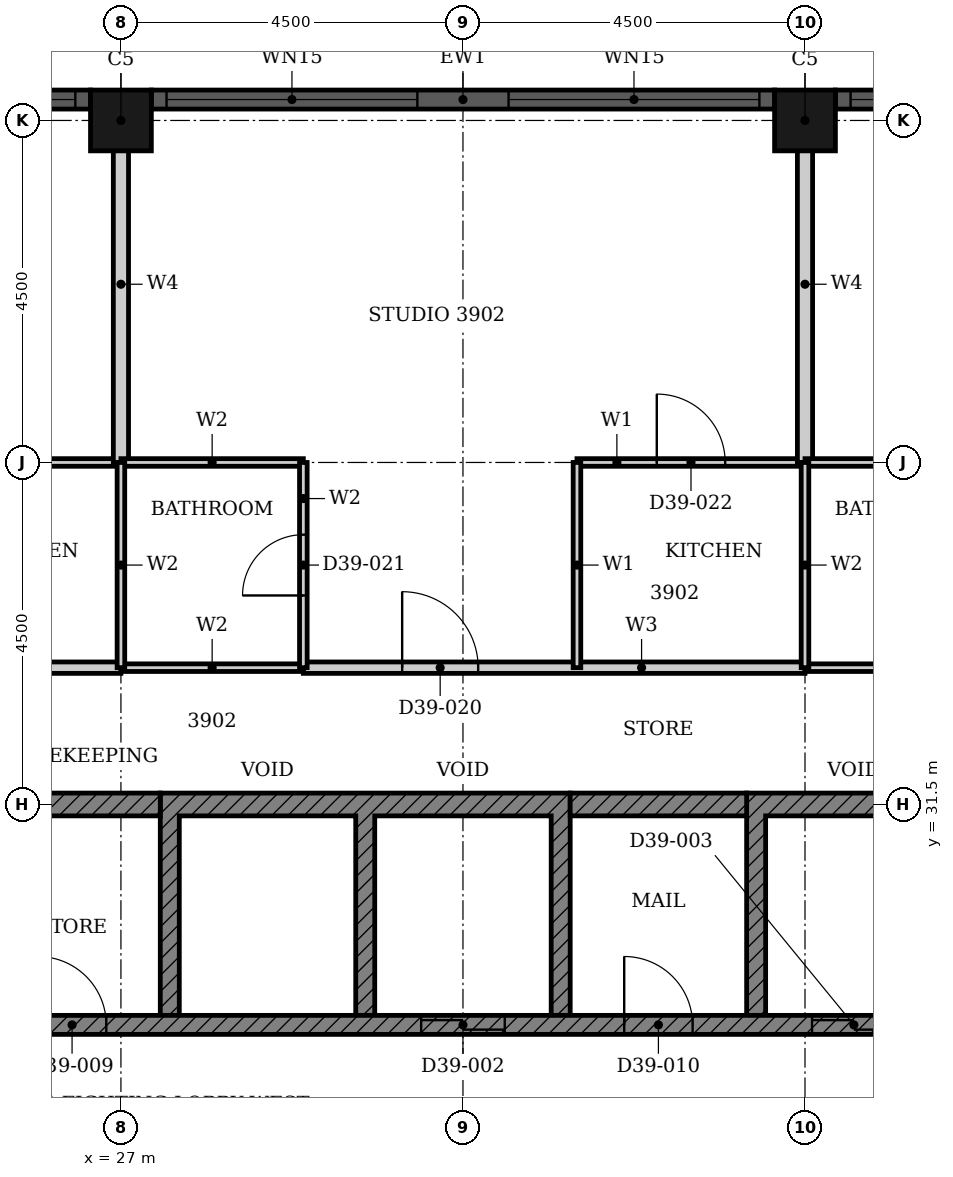
"""IFC4 building model, lengths in metres.
Left out: names, types, materials, properties, quantities, classifications, styles, units other than length and angle.
Written with IfcOpenShell. Run it as: python <this file> out.ifc"""

import sys

from ifc_helpers import new_model, si_unit, direction, frame, frame_2d, origin, origin_2d, place, context, subcontext, project, spatial, polyline, rectangle, hollow_rectangle, outline, extrude, element, fill, save


model = new_model("IFC4")
c1 = context("Model", 3, precision=1e-05, world=origin(), true_north=direction((0.0, 1.0)))
c2 = subcontext(c1, "Body", "Model", "MODEL_VIEW")
j1 = project(units=[si_unit("LENGTHUNIT", "METRE"), si_unit("PLANEANGLEUNIT", "RADIAN")], contexts=[c1])
p1 = place(None, origin())
s1 = spatial("IfcSite", under=j1, at=p1, CompositionType="ELEMENT")
p2 = place(p1, origin())
s2 = spatial("IfcBuilding", under=s1, at=p2, CompositionType="ELEMENT")
p3 = place(p2, frame((0.0, 0.0, 158.0)))
s3 = spatial("IfcBuildingStorey", under=s2, at=p3, CompositionType="ELEMENT", Elevation=158.0)
for number, where, z_axis, x_axis in (
    (1, (36.0, 40.5, 0.0), (0.0, 0.0, 1.0), (1.0, 0.0, 0.0)),
    (2, (27.0, 40.5, 0.0), (0.0, 0.0, 1.0), (1.0, 0.0, 0.0)),
):
    element("IfcColumn", number, at=place(p3, frame(where, z_axis=z_axis, x_axis=x_axis)), inside=s3, PredefinedType="COLUMN", context=c2, shape_type="SweptSolid", body=[
        extrude(hollow_rectangle(XDim=0.8, YDim=0.8, WallThickness=0.025, at=origin_2d()), origin(), (0.0, 0.0, 1.0), 3.7),
    ])
p4 = place(p3, frame((44.6, 40.775, 0.0), z_axis=(0.0, 0.0, 1.0), x_axis=(-1.0, 0.0, 0.0)))
e3 = element("IfcWall", 3, at=p4, inside=s3, PredefinedType="SOLIDWALL", context=c2, shape_type="SweptSolid", body=[
    extrude(rectangle(XDim=8.2, YDim=0.25, at=frame_2d((4.1, 0.0))), origin(), (0.0, 0.0, 1.0), 3.7),
])
p5 = place(p4, frame((0.2, 0.0, 0.45)))
e4 = element("IfcOpeningElement", 4, at=p5, cuts=e3, PredefinedType="OPENING", context=c2, shape_type="SweptSolid", body=[
    extrude(rectangle(XDim=3.3, YDim=2.3, at=frame_2d((1.65, 1.15))), frame((0.0, 0.135, 0.0), z_axis=(0.0, -1.0, 0.0), x_axis=(1.0, 0.0, 0.0)), (0.0, 0.0, 1.0), 0.27),
])
p6 = place(p4, frame((4.7, 0.0, 0.45)))
e5 = element("IfcOpeningElement", 5, at=p6, cuts=e3, PredefinedType="OPENING", context=c2, shape_type="SweptSolid", body=[
    extrude(rectangle(XDim=3.3, YDim=2.3, at=frame_2d((1.65, 1.15))), frame((0.0, 0.135, 0.0), z_axis=(0.0, -1.0, 0.0), x_axis=(1.0, 0.0, 0.0)), (0.0, 0.0, 1.0), 0.27),
])
p7 = place(p3, frame((35.6, 40.775, 0.0), z_axis=(0.0, 0.0, 1.0), x_axis=(-1.0, 0.0, 0.0)))
e6 = element("IfcWall", 6, at=p7, inside=s3, PredefinedType="SOLIDWALL", context=c2, shape_type="SweptSolid", body=[
    extrude(rectangle(XDim=8.2, YDim=0.25, at=frame_2d((4.1, 0.0))), origin(), (0.0, 0.0, 1.0), 3.7),
])
p8 = place(p7, frame((0.2, 0.0, 0.45)))
e7 = element("IfcOpeningElement", 7, at=p8, cuts=e6, PredefinedType="OPENING", context=c2, shape_type="SweptSolid", body=[
    extrude(rectangle(XDim=3.3, YDim=2.3, at=frame_2d((1.65, 1.15))), frame((0.0, 0.135, 0.0), z_axis=(0.0, -1.0, 0.0), x_axis=(1.0, 0.0, 0.0)), (0.0, 0.0, 1.0), 0.27),
])
p9 = place(p7, frame((4.7, 0.0, 0.45)))
e8 = element("IfcOpeningElement", 8, at=p9, cuts=e6, PredefinedType="OPENING", context=c2, shape_type="SweptSolid", body=[
    extrude(rectangle(XDim=3.3, YDim=2.3, at=frame_2d((1.65, 1.15))), frame((0.0, 0.135, 0.0), z_axis=(0.0, -1.0, 0.0), x_axis=(1.0, 0.0, 0.0)), (0.0, 0.0, 1.0), 0.27),
])
p10 = place(p3, frame((26.6, 40.775, 0.0), z_axis=(0.0, 0.0, 1.0), x_axis=(-1.0, 0.0, 0.0)))
e9 = element("IfcWall", 9, at=p10, inside=s3, PredefinedType="SOLIDWALL", context=c2, shape_type="SweptSolid", body=[
    extrude(rectangle(XDim=8.2, YDim=0.25, at=frame_2d((4.1, 0.0))), origin(), (0.0, 0.0, 1.0), 3.7),
])
p11 = place(p10, frame((0.2, 0.0, 0.45)))
e10 = element("IfcOpeningElement", 10, at=p11, cuts=e9, PredefinedType="OPENING", context=c2, shape_type="SweptSolid", body=[
    extrude(rectangle(XDim=3.3, YDim=2.3, at=frame_2d((1.65, 1.15))), frame((0.0, 0.135, 0.0), z_axis=(0.0, -1.0, 0.0), x_axis=(1.0, 0.0, 0.0)), (0.0, 0.0, 1.0), 0.27),
])
p12 = place(p10, frame((4.7, 0.0, 0.45)))
e11 = element("IfcOpeningElement", 11, at=p12, cuts=e9, PredefinedType="OPENING", context=c2, shape_type="SweptSolid", body=[
    extrude(rectangle(XDim=3.3, YDim=2.3, at=frame_2d((1.65, 1.15))), frame((0.0, 0.135, 0.0), z_axis=(0.0, -1.0, 0.0), x_axis=(1.0, 0.0, 0.0)), (0.0, 0.0, 1.0), 0.27),
])
p13 = place(p3, origin())
e12 = element("IfcWall", 12, at=p13, inside=s3, PredefinedType="SHEAR", context=c2, shape_type="SweptSolid", body=[
    extrude(outline(polyline([(27.518, 28.725), (27.768, 28.725), (27.768, 31.35), (30.089, 31.35), (30.089, 28.725), (30.339, 28.725), (30.339, 31.35), (32.661, 31.35), (32.661, 28.725), (32.911, 28.725), (32.911, 31.65), (27.518, 31.65), (27.518, 28.725)])), origin(), (0.0, 0.0, 1.0), 3.4),
])
p14 = place(p3, origin())
e13 = element("IfcWall", 13, at=p14, inside=s3, PredefinedType="SHEAR", context=c2, shape_type="SweptSolid", body=[
    extrude(outline(polyline([(35.232, 28.725), (35.482, 28.725), (35.482, 31.35), (37.803, 31.35), (37.803, 28.725), (38.053, 28.725), (38.053, 31.35), (40.375, 31.35), (40.375, 28.725), (40.625, 28.725), (40.625, 31.65), (35.232, 31.65), (35.232, 28.725)])), origin(), (0.0, 0.0, 1.0), 3.4),
])
p15 = place(p3, frame((18.15, 31.5, 0.0), z_axis=(0.0, 0.0, 1.0), x_axis=(1.0, 0.0, 0.0)))
e14 = element("IfcWall", 14, at=p15, inside=s3, PredefinedType="SHEAR", context=c2, shape_type="SweptSolid", body=[
    extrude(rectangle(XDim=9.368, YDim=0.3, at=frame_2d((4.684, 0.0))), origin(), (0.0, 0.0, 1.0), 3.4),
])
p16 = place(p15, frame((4.736, 0.0, 0.0)))
e15 = element("IfcOpeningElement", 15, at=p16, cuts=e14, PredefinedType="OPENING", context=c2, shape_type="SweptSolid", body=[
    extrude(rectangle(XDim=1.8, YDim=2.1, at=frame_2d((0.9, 1.05))), frame((0.0, 0.16, 0.0), z_axis=(0.0, -1.0, 0.0), x_axis=(1.0, 0.0, 0.0)), (0.0, 0.0, 1.0), 0.32),
])
p17 = place(p3, frame((32.911, 31.5, 0.0), z_axis=(0.0, 0.0, 1.0), x_axis=(1.0, 0.0, 0.0)))
e16 = element("IfcWall", 16, at=p17, inside=s3, PredefinedType="SHEAR", context=c2, shape_type="SweptSolid", body=[
    extrude(rectangle(XDim=2.322, YDim=0.3, at=frame_2d((1.161, 0.0))), origin(), (0.0, 0.0, 1.0), 3.4),
])
p18 = place(p3, frame((24.947, 28.6, 0.0), z_axis=(0.0, 0.0, 1.0), x_axis=(1.0, 0.0, 0.0)))
e17 = element("IfcWall", 17, at=p18, inside=s3, PredefinedType="SHEAR", context=c2, shape_type="SweptSolid", body=[
    extrude(rectangle(XDim=15.678, YDim=0.25, at=frame_2d((7.839, 0.0))), origin(), (0.0, 0.0, 1.0), 3.4),
])
p19 = place(p18, frame((6.004, 0.0, 0.0)))
e18 = element("IfcOpeningElement", 18, at=p19, cuts=e17, PredefinedType="OPENING", context=c2, shape_type="SweptSolid", body=[
    extrude(rectangle(XDim=1.1, YDim=2.1, at=frame_2d((0.55, 1.05))), frame((0.0, 0.135, 0.0), z_axis=(0.0, -1.0, 0.0), x_axis=(1.0, 0.0, 0.0)), (0.0, 0.0, 1.0), 0.27),
])
p20 = place(p18, frame((11.146, 0.0, 0.0)))
e19 = element("IfcOpeningElement", 19, at=p20, cuts=e17, PredefinedType="OPENING", context=c2, shape_type="SweptSolid", body=[
    extrude(rectangle(XDim=1.1, YDim=2.1, at=frame_2d((0.55, 1.05))), frame((0.0, 0.135, 0.0), z_axis=(0.0, -1.0, 0.0), x_axis=(1.0, 0.0, 0.0)), (0.0, 0.0, 1.0), 0.27),
])
p21 = place(p18, frame((13.718, 0.0, 0.0)))
e20 = element("IfcOpeningElement", 20, at=p21, cuts=e17, PredefinedType="OPENING", context=c2, shape_type="SweptSolid", body=[
    extrude(rectangle(XDim=1.1, YDim=2.1, at=frame_2d((0.55, 1.05))), frame((0.0, 0.135, 0.0), z_axis=(0.0, -1.0, 0.0), x_axis=(1.0, 0.0, 0.0)), (0.0, 0.0, 1.0), 0.27),
])
p22 = place(p18, frame((0.961, 0.0, 0.0)))
e21 = element("IfcOpeningElement", 21, at=p22, cuts=e17, PredefinedType="OPENING", context=c2, shape_type="SweptSolid", body=[
    extrude(rectangle(XDim=0.9, YDim=2.1, at=frame_2d((0.45, 1.05))), frame((0.0, 0.135, 0.0), z_axis=(0.0, -1.0, 0.0), x_axis=(1.0, 0.0, 0.0)), (0.0, 0.0, 1.0), 0.27),
])
p23 = place(p18, frame((8.675, 0.0, 0.0)))
e22 = element("IfcOpeningElement", 22, at=p23, cuts=e17, PredefinedType="OPENING", context=c2, shape_type="SweptSolid", body=[
    extrude(rectangle(XDim=0.9, YDim=2.1, at=frame_2d((0.45, 1.05))), frame((0.0, 0.135, 0.0), z_axis=(0.0, -1.0, 0.0), x_axis=(1.0, 0.0, 0.0)), (0.0, 0.0, 1.0), 0.27),
])
p24 = place(p3, frame((20.4, 33.3, 0.0), z_axis=(0.0, 0.0, 1.0), x_axis=(1.0, 0.0, 0.0)))
e23 = element("IfcWall", 23, at=p24, inside=s3, PredefinedType="PARTITIONING", context=c2, shape_type="SweptSolid", body=[
    extrude(rectangle(XDim=6.6, YDim=0.15, at=frame_2d((3.3, 0.0))), origin(), (0.0, 0.0, 1.0), 3.4),
])
p25 = place(p24, frame((1.3, 0.0, 0.0)))
e24 = element("IfcOpeningElement", 24, at=p25, cuts=e23, PredefinedType="OPENING", context=c2, shape_type="SweptSolid", body=[
    extrude(rectangle(XDim=1.0, YDim=2.2, at=frame_2d((0.5, 1.1))), frame((0.0, 0.085, 0.0), z_axis=(0.0, -1.0, 0.0), x_axis=(1.0, 0.0, 0.0)), (0.0, 0.0, 1.0), 0.17),
])
p26 = place(p3, frame((29.4, 33.3, 0.0), z_axis=(0.0, 0.0, 1.0), x_axis=(1.0, 0.0, 0.0)))
e25 = element("IfcWall", 25, at=p26, inside=s3, PredefinedType="PARTITIONING", context=c2, shape_type="SweptSolid", body=[
    extrude(rectangle(XDim=6.6, YDim=0.15, at=frame_2d((3.3, 0.0))), origin(), (0.0, 0.0, 1.0), 3.4),
])
p27 = place(p26, frame((1.3, 0.0, 0.0)))
e26 = element("IfcOpeningElement", 26, at=p27, cuts=e25, PredefinedType="OPENING", context=c2, shape_type="SweptSolid", body=[
    extrude(rectangle(XDim=1.0, YDim=2.2, at=frame_2d((0.5, 1.1))), frame((0.0, 0.085, 0.0), z_axis=(0.0, -1.0, 0.0), x_axis=(1.0, 0.0, 0.0)), (0.0, 0.0, 1.0), 0.17),
])
p28 = place(p3, frame((24.0, 36.0, 0.0), z_axis=(0.0, 0.0, 1.0), x_axis=(1.0, 0.0, 0.0)))
e27 = element("IfcWall", 27, at=p28, inside=s3, PredefinedType="PARTITIONING", context=c2, shape_type="SweptSolid", body=[
    extrude(rectangle(XDim=3.0, YDim=0.1, at=frame_2d((1.5, 0.0))), origin(), (0.0, 0.0, 1.0), 3.4),
])
p29 = place(p28, frame((1.05, 0.0, 0.0)))
e28 = element("IfcOpeningElement", 28, at=p29, cuts=e27, PredefinedType="OPENING", context=c2, shape_type="SweptSolid", body=[
    extrude(rectangle(XDim=0.9, YDim=2.1, at=frame_2d((0.45, 1.05))), frame((0.0, 0.06, 0.0), z_axis=(0.0, -1.0, 0.0), x_axis=(1.0, 0.0, 0.0)), (0.0, 0.0, 1.0), 0.12),
])
p30 = place(p3, frame((33.0, 36.0, 0.0), z_axis=(0.0, 0.0, 1.0), x_axis=(1.0, 0.0, 0.0)))
e29 = element("IfcWall", 29, at=p30, inside=s3, PredefinedType="PARTITIONING", context=c2, shape_type="SweptSolid", body=[
    extrude(rectangle(XDim=3.0, YDim=0.1, at=frame_2d((1.5, 0.0))), origin(), (0.0, 0.0, 1.0), 3.4),
])
p31 = place(p30, frame((1.05, 0.0, 0.0)))
e30 = element("IfcOpeningElement", 30, at=p31, cuts=e29, PredefinedType="OPENING", context=c2, shape_type="SweptSolid", body=[
    extrude(rectangle(XDim=0.9, YDim=2.1, at=frame_2d((0.45, 1.05))), frame((0.0, 0.06, 0.0), z_axis=(0.0, -1.0, 0.0), x_axis=(1.0, 0.0, 0.0)), (0.0, 0.0, 1.0), 0.12),
])
p32 = place(p3, frame((33.0, 33.3, 0.0), z_axis=(0.0, 0.0, 1.0), x_axis=(0.0, 1.0, 0.0)))
e31 = element("IfcWall", 31, at=p32, inside=s3, PredefinedType="PARTITIONING", context=c2, shape_type="SweptSolid", body=[
    extrude(rectangle(XDim=2.7, YDim=0.1, at=frame_2d((1.35, 0.0))), origin(), (0.0, 0.0, 1.0), 3.4),
])
for number, where, z_axis, x_axis in (
    (32, (27.0, 36.0, 0.0), (0.0, 0.0, 1.0), (0.0, 1.0, 0.0)),
    (33, (36.0, 36.0, 0.0), (0.0, 0.0, 1.0), (0.0, 1.0, 0.0)),
):
    element("IfcWall", number, at=place(p3, frame(where, z_axis=z_axis, x_axis=x_axis)), inside=s3, PredefinedType="PARTITIONING", context=c2, shape_type="SweptSolid", body=[
        extrude(rectangle(XDim=4.69, YDim=0.2, at=frame_2d((2.345, 0.0))), origin(), (0.0, 0.0, 1.0), 3.4),
    ])
for number, where, z_axis, x_axis in (
    (34, (27.0, 33.3, 0.0), (0.0, 0.0, 1.0), (1.0, 0.0, 0.0)),
    (35, (36.0, 33.3, 0.0), (0.0, 0.0, 1.0), (1.0, 0.0, 0.0)),
    (36, (27.0, 36.0, 0.0), (0.0, 0.0, 1.0), (1.0, 0.0, 0.0)),
    (37, (36.0, 36.0, 0.0), (0.0, 0.0, 1.0), (1.0, 0.0, 0.0)),
):
    element("IfcWall", number, at=place(p3, frame(where, z_axis=z_axis, x_axis=x_axis)), inside=s3, PredefinedType="PARTITIONING", context=c2, shape_type="SweptSolid", body=[
        extrude(rectangle(XDim=2.4, YDim=0.1, at=frame_2d((1.2, 0.0))), origin(), (0.0, 0.0, 1.0), 3.4),
    ])
p33 = place(p3, frame((27.0, 33.3, 0.0), z_axis=(0.0, 0.0, 1.0), x_axis=(0.0, 1.0, 0.0)))
e38 = element("IfcWall", 38, at=p33, inside=s3, PredefinedType="PARTITIONING", context=c2, shape_type="SweptSolid", body=[
    extrude(rectangle(XDim=2.7, YDim=0.1, at=frame_2d((1.35, 0.0))), origin(), (0.0, 0.0, 1.0), 3.4),
])
p34 = place(p3, frame((29.4, 33.3, 0.0), z_axis=(0.0, 0.0, 1.0), x_axis=(0.0, 1.0, 0.0)))
e39 = element("IfcWall", 39, at=p34, inside=s3, PredefinedType="PARTITIONING", context=c2, shape_type="SweptSolid", body=[
    extrude(rectangle(XDim=2.7, YDim=0.1, at=frame_2d((1.35, 0.0))), origin(), (0.0, 0.0, 1.0), 3.4),
])
p35 = place(p34, frame((0.95, 0.0, 0.0)))
e40 = element("IfcOpeningElement", 40, at=p35, cuts=e39, PredefinedType="OPENING", context=c2, shape_type="SweptSolid", body=[
    extrude(rectangle(XDim=0.8, YDim=2.1, at=frame_2d((0.4, 1.05))), frame((0.0, 0.06, 0.0), z_axis=(0.0, -1.0, 0.0), x_axis=(1.0, 0.0, 0.0)), (0.0, 0.0, 1.0), 0.12),
])
p36 = place(p3, frame((36.0, 33.3, 0.0), z_axis=(0.0, 0.0, 1.0), x_axis=(0.0, 1.0, 0.0)))
e41 = element("IfcWall", 41, at=p36, inside=s3, PredefinedType="PARTITIONING", context=c2, shape_type="SweptSolid", body=[
    extrude(rectangle(XDim=2.7, YDim=0.1, at=frame_2d((1.35, 0.0))), origin(), (0.0, 0.0, 1.0), 3.4),
])
p37 = place(p6, origin())
e42 = element("IfcWindow", 42, at=p37, inside=s3, PartitioningType="SINGLE_PANEL", PredefinedType="WINDOW", context=c2, shape_type="SweptSolid", body=[
    extrude(rectangle(XDim=3.3, YDim=2.3, at=frame_2d((1.65, 1.15))), frame((0.0, 0.03, 0.0), z_axis=(0.0, -1.0, 0.0), x_axis=(1.0, 0.0, 0.0)), (0.0, 0.0, 1.0), 0.06),
])
fill(e5, e42)
p38 = place(p8, origin())
e43 = element("IfcWindow", 43, at=p38, inside=s3, PartitioningType="SINGLE_PANEL", PredefinedType="WINDOW", context=c2, shape_type="SweptSolid", body=[
    extrude(rectangle(XDim=3.3, YDim=2.3, at=frame_2d((1.65, 1.15))), frame((0.0, 0.03, 0.0), z_axis=(0.0, -1.0, 0.0), x_axis=(1.0, 0.0, 0.0)), (0.0, 0.0, 1.0), 0.06),
])
fill(e7, e43)
p39 = place(p9, origin())
e44 = element("IfcWindow", 44, at=p39, inside=s3, PartitioningType="SINGLE_PANEL", PredefinedType="WINDOW", context=c2, shape_type="SweptSolid", body=[
    extrude(rectangle(XDim=3.3, YDim=2.3, at=frame_2d((1.65, 1.15))), frame((0.0, 0.03, 0.0), z_axis=(0.0, -1.0, 0.0), x_axis=(1.0, 0.0, 0.0)), (0.0, 0.0, 1.0), 0.06),
])
fill(e8, e44)
p40 = place(p11, origin())
e45 = element("IfcWindow", 45, at=p40, inside=s3, PartitioningType="SINGLE_PANEL", PredefinedType="WINDOW", context=c2, shape_type="SweptSolid", body=[
    extrude(rectangle(XDim=3.3, YDim=2.3, at=frame_2d((1.65, 1.15))), frame((0.0, 0.03, 0.0), z_axis=(0.0, -1.0, 0.0), x_axis=(1.0, 0.0, 0.0)), (0.0, 0.0, 1.0), 0.06),
])
fill(e10, e45)
p41 = place(p19, origin())
e46 = element("IfcDoor", 46, at=p41, inside=s3, OperationType="DOUBLE_DOOR_SLIDING", PredefinedType="DOOR", context=c2, shape_type="SweptSolid", body=[
    extrude(rectangle(XDim=1.1, YDim=2.1, at=frame_2d((0.55, 1.05))), frame((0.0, 0.025, 0.0), z_axis=(0.0, -1.0, 0.0), x_axis=(1.0, 0.0, 0.0)), (0.0, 0.0, 1.0), 0.05),
])
fill(e18, e46)
p42 = place(p20, origin())
e47 = element("IfcDoor", 47, at=p42, inside=s3, OperationType="DOUBLE_DOOR_SLIDING", PredefinedType="DOOR", context=c2, shape_type="SweptSolid", body=[
    extrude(rectangle(XDim=1.1, YDim=2.1, at=frame_2d((0.55, 1.05))), frame((0.0, 0.025, 0.0), z_axis=(0.0, -1.0, 0.0), x_axis=(1.0, 0.0, 0.0)), (0.0, 0.0, 1.0), 0.05),
])
fill(e19, e47)
p43 = place(p22, origin())
e48 = element("IfcDoor", 48, at=p43, inside=s3, OperationType="SINGLE_SWING_LEFT", PredefinedType="DOOR", context=c2, shape_type="SweptSolid", body=[
    extrude(rectangle(XDim=0.9, YDim=2.1, at=frame_2d((0.45, 1.05))), frame((0.0, 0.025, 0.0), z_axis=(0.0, -1.0, 0.0), x_axis=(1.0, 0.0, 0.0)), (0.0, 0.0, 1.0), 0.05),
])
fill(e21, e48)
p44 = place(p23, origin())
e49 = element("IfcDoor", 49, at=p44, inside=s3, OperationType="SINGLE_SWING_LEFT", PredefinedType="DOOR", context=c2, shape_type="SweptSolid", body=[
    extrude(rectangle(XDim=0.9, YDim=2.1, at=frame_2d((0.45, 1.05))), frame((0.0, 0.025, 0.0), z_axis=(0.0, -1.0, 0.0), x_axis=(1.0, 0.0, 0.0)), (0.0, 0.0, 1.0), 0.05),
])
fill(e22, e49)
p45 = place(p27, origin())
e50 = element("IfcDoor", 50, at=p45, inside=s3, OperationType="SINGLE_SWING_LEFT", PredefinedType="DOOR", context=c2, shape_type="SweptSolid", body=[
    extrude(rectangle(XDim=1.0, YDim=2.2, at=frame_2d((0.5, 1.1))), frame((0.0, 0.025, 0.0), z_axis=(0.0, -1.0, 0.0), x_axis=(1.0, 0.0, 0.0)), (0.0, 0.0, 1.0), 0.05),
])
fill(e26, e50)
p46 = place(p35, origin())
e51 = element("IfcDoor", 51, at=p46, inside=s3, OperationType="SINGLE_SWING_RIGHT", PredefinedType="DOOR", context=c2, shape_type="SweptSolid", body=[
    extrude(rectangle(XDim=0.8, YDim=2.1, at=frame_2d((0.4, 1.05))), frame((0.0, 0.025, 0.0), z_axis=(0.0, -1.0, 0.0), x_axis=(1.0, 0.0, 0.0)), (0.0, 0.0, 1.0), 0.05),
])
fill(e40, e51)
p47 = place(p31, origin())
e52 = element("IfcDoor", 52, at=p47, inside=s3, OperationType="SINGLE_SWING_LEFT", PredefinedType="DOOR", context=c2, shape_type="SweptSolid", body=[
    extrude(rectangle(XDim=0.9, YDim=2.1, at=frame_2d((0.45, 1.05))), frame((0.0, 0.025, 0.0), z_axis=(0.0, -1.0, 0.0), x_axis=(1.0, 0.0, 0.0)), (0.0, 0.0, 1.0), 0.05),
])
fill(e30, e52)
save(model, sys.argv[1])
